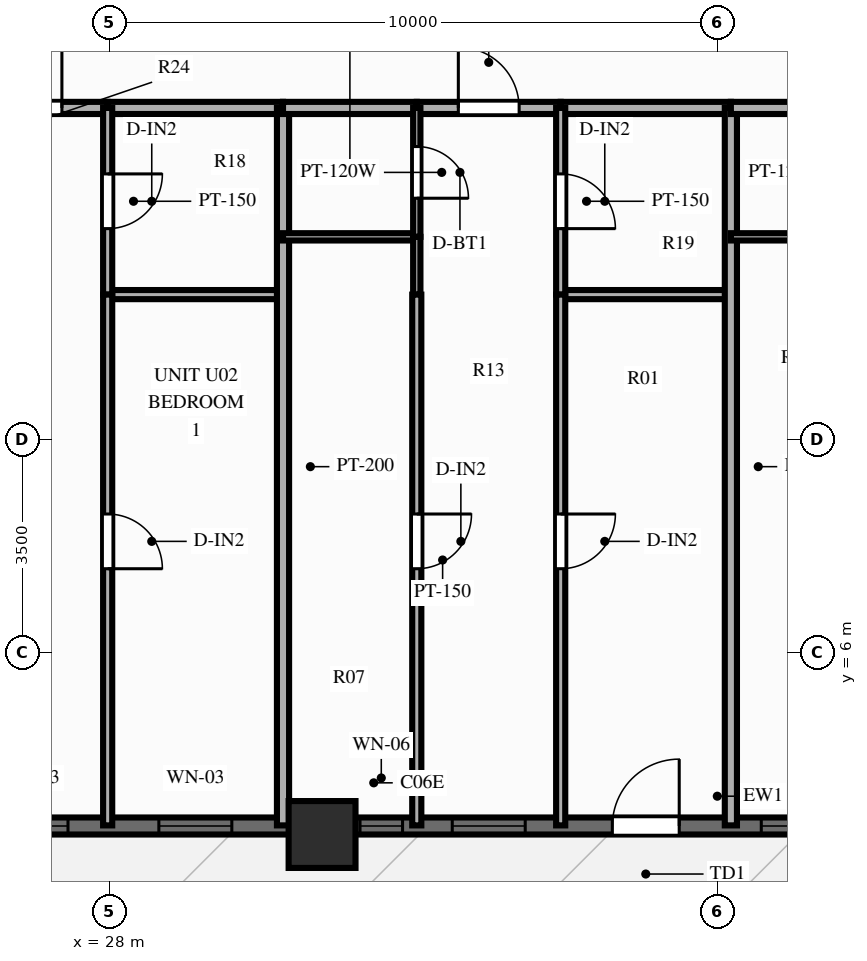
"""IFC4 building model, lengths in metres.
Left out: names, types, materials, properties, quantities, classifications, styles, units other than length and angle.
Written with IfcOpenShell. Run it as: python <this file> out.ifc"""

import sys

from ifc_helpers import new_model, si_unit, direction, frame, frame_2d, origin, origin_2d, place, context, subcontext, project, spatial, rectangle, extrude, source, transform, mapped, element, fill, save


model = new_model("IFC4")
c1 = context("Model", 3, precision=1e-05, world=origin(), true_north=direction((0.0, 1.0)))
c2 = subcontext(c1, "Body", "Model", "MODEL_VIEW")
j1 = project(units=[si_unit("LENGTHUNIT", "METRE"), si_unit("PLANEANGLEUNIT", "RADIAN")], contexts=[c1])
p1 = place(None, origin())
s1 = spatial("IfcSite", under=j1, at=p1, CompositionType="ELEMENT")
p2 = place(p1, origin())
s2 = spatial("IfcBuilding", under=s1, at=p2, CompositionType="ELEMENT")
p3 = place(p2, frame((0.0, 0.0, 25.4)))
s3 = spatial("IfcBuildingStorey", under=s2, at=p3, CompositionType="ELEMENT", Elevation=25.4)
m1 = source(origin(), c2, "Body", "SweptSolid", [
    extrude(rectangle(XDim=1.1, YDim=1.1, at=origin_2d()), origin(), (0.0, 0.0, 1.0), 3.0),
])
p4 = place(p3, frame((31.5, 3.0, 0.0), z_axis=(0.0, 0.0, 1.0), x_axis=(1.0, 0.0, 0.0)))
e1 = element("IfcColumn", 1, at=p4, inside=s3, PredefinedType="COLUMN", context=c2, shape_type="MappedRepresentation", body=[
    mapped(m1, transform((0.0, 0.0, 0.0), scale=1.0)),
])
p5 = place(p3, frame((15.5, 3.14, 0.0), z_axis=(0.0, 0.0, 1.0), x_axis=(1.0, 0.0, 0.0)))
e2 = element("IfcWall", 2, at=p5, inside=s3, PredefinedType="SOLIDWALL", context=c2, shape_type="SweptSolid", body=[
    extrude(rectangle(XDim=45.0, YDim=0.28, at=frame_2d((22.5, 0.0))), origin(), (0.0, 0.0, 1.0), 2.28),
])
p6 = place(p5, frame((0.785, 0.0, 0.25)))
e3 = element("IfcOpeningElement", 3, at=p6, cuts=e2, PredefinedType="OPENING", context=c2, shape_type="SweptSolid", body=[
    extrude(rectangle(XDim=1.2, YDim=1.5, at=frame_2d((0.6, 0.75))), frame((0.0, 0.152, 0.0), z_axis=(0.0, -1.0, 0.0), x_axis=(1.0, 0.0, 0.0)), (0.0, 0.0, 1.0), 0.304),
])
p7 = place(p5, frame((3.033, 0.0, 0.25)))
e4 = element("IfcOpeningElement", 4, at=p7, cuts=e2, PredefinedType="OPENING", context=c2, shape_type="SweptSolid", body=[
    extrude(rectangle(XDim=1.2, YDim=1.5, at=frame_2d((0.6, 0.75))), frame((0.0, 0.152, 0.0), z_axis=(0.0, -1.0, 0.0), x_axis=(1.0, 0.0, 0.0)), (0.0, 0.0, 1.0), 0.304),
])
p8 = place(p5, frame((5.727, 0.0, 0.25)))
e5 = element("IfcOpeningElement", 5, at=p8, cuts=e2, PredefinedType="OPENING", context=c2, shape_type="SweptSolid", body=[
    extrude(rectangle(XDim=1.2, YDim=1.5, at=frame_2d((0.6, 0.75))), frame((0.0, 0.152, 0.0), z_axis=(0.0, -1.0, 0.0), x_axis=(1.0, 0.0, 0.0)), (0.0, 0.0, 1.0), 0.304),
])
p9 = place(p5, frame((8.269, 0.0, 0.25)))
e6 = element("IfcOpeningElement", 6, at=p9, cuts=e2, PredefinedType="OPENING", context=c2, shape_type="SweptSolid", body=[
    extrude(rectangle(XDim=1.2, YDim=1.5, at=frame_2d((0.6, 0.75))), frame((0.0, 0.152, 0.0), z_axis=(0.0, -1.0, 0.0), x_axis=(1.0, 0.0, 0.0)), (0.0, 0.0, 1.0), 0.304),
])
p10 = place(p5, frame((10.621, 0.0, 0.25)))
e7 = element("IfcOpeningElement", 7, at=p10, cuts=e2, PredefinedType="OPENING", context=c2, shape_type="SweptSolid", body=[
    extrude(rectangle(XDim=1.2, YDim=1.5, at=frame_2d((0.6, 0.75))), frame((0.0, 0.152, 0.0), z_axis=(0.0, -1.0, 0.0), x_axis=(1.0, 0.0, 0.0)), (0.0, 0.0, 1.0), 0.304),
])
p11 = place(p5, frame((13.316, 0.0, 0.25)))
e8 = element("IfcOpeningElement", 8, at=p11, cuts=e2, PredefinedType="OPENING", context=c2, shape_type="SweptSolid", body=[
    extrude(rectangle(XDim=1.2, YDim=1.5, at=frame_2d((0.6, 0.75))), frame((0.0, 0.152, 0.0), z_axis=(0.0, -1.0, 0.0), x_axis=(1.0, 0.0, 0.0)), (0.0, 0.0, 1.0), 0.304),
])
p12 = place(p5, frame((16.624, 0.0, 0.25)))
e9 = element("IfcOpeningElement", 9, at=p12, cuts=e2, PredefinedType="OPENING", context=c2, shape_type="SweptSolid", body=[
    extrude(rectangle(XDim=0.7, YDim=1.5, at=frame_2d((0.35, 0.75))), frame((0.0, 0.152, 0.0), z_axis=(0.0, -1.0, 0.0), x_axis=(1.0, 0.0, 0.0)), (0.0, 0.0, 1.0), 0.304),
])
p13 = place(p5, frame((18.141, 0.0, 0.25)))
e10 = element("IfcOpeningElement", 10, at=p13, cuts=e2, PredefinedType="OPENING", context=c2, shape_type="SweptSolid", body=[
    extrude(rectangle(XDim=1.2, YDim=1.5, at=frame_2d((0.6, 0.75))), frame((0.0, 0.152, 0.0), z_axis=(0.0, -1.0, 0.0), x_axis=(1.0, 0.0, 0.0)), (0.0, 0.0, 1.0), 0.304),
])
p14 = place(p5, frame((21.874, 0.0, 0.0), z_axis=(0.0, 0.0, 1.0), x_axis=(-1.0, 0.0, 0.0)))
e11 = element("IfcOpeningElement", 11, at=p14, cuts=e2, PredefinedType="OPENING", context=c2, shape_type="SweptSolid", body=[
    extrude(rectangle(XDim=1.1, YDim=2.15, at=frame_2d((0.55, 1.075))), frame((0.0, 0.152, 0.0), z_axis=(0.0, -1.0, 0.0), x_axis=(1.0, 0.0, 0.0)), (0.0, 0.0, 1.0), 0.304),
])
p15 = place(p5, frame((23.223, 0.0, 0.25)))
e12 = element("IfcOpeningElement", 12, at=p15, cuts=e2, PredefinedType="OPENING", context=c2, shape_type="SweptSolid", body=[
    extrude(rectangle(XDim=1.2, YDim=1.5, at=frame_2d((0.6, 0.75))), frame((0.0, 0.152, 0.0), z_axis=(0.0, -1.0, 0.0), x_axis=(1.0, 0.0, 0.0)), (0.0, 0.0, 1.0), 0.304),
])
p16 = place(p5, frame((25.507, 0.0, 0.25)))
e13 = element("IfcOpeningElement", 13, at=p16, cuts=e2, PredefinedType="OPENING", context=c2, shape_type="SweptSolid", body=[
    extrude(rectangle(XDim=1.2, YDim=1.5, at=frame_2d((0.6, 0.75))), frame((0.0, 0.152, 0.0), z_axis=(0.0, -1.0, 0.0), x_axis=(1.0, 0.0, 0.0)), (0.0, 0.0, 1.0), 0.304),
])
p17 = place(p5, frame((27.6, 0.0, 0.25)))
e14 = element("IfcOpeningElement", 14, at=p17, cuts=e2, PredefinedType="OPENING", context=c2, shape_type="SweptSolid", body=[
    extrude(rectangle(XDim=0.7, YDim=1.5, at=frame_2d((0.35, 0.75))), frame((0.0, 0.152, 0.0), z_axis=(0.0, -1.0, 0.0), x_axis=(1.0, 0.0, 0.0)), (0.0, 0.0, 1.0), 0.304),
])
p18 = place(p5, frame((30.589, 0.0, 0.25)))
e15 = element("IfcOpeningElement", 15, at=p18, cuts=e2, PredefinedType="OPENING", context=c2, shape_type="SweptSolid", body=[
    extrude(rectangle(XDim=1.2, YDim=1.5, at=frame_2d((0.6, 0.75))), frame((0.0, 0.152, 0.0), z_axis=(0.0, -1.0, 0.0), x_axis=(1.0, 0.0, 0.0)), (0.0, 0.0, 1.0), 0.304),
])
p19 = place(p5, frame((32.872, 0.0, 0.25)))
e16 = element("IfcOpeningElement", 16, at=p19, cuts=e2, PredefinedType="OPENING", context=c2, shape_type="SweptSolid", body=[
    extrude(rectangle(XDim=1.2, YDim=1.5, at=frame_2d((0.6, 0.75))), frame((0.0, 0.152, 0.0), z_axis=(0.0, -1.0, 0.0), x_axis=(1.0, 0.0, 0.0)), (0.0, 0.0, 1.0), 0.304),
])
p20 = place(p5, frame((35.455, 0.0, 0.25)))
e17 = element("IfcOpeningElement", 17, at=p20, cuts=e2, PredefinedType="OPENING", context=c2, shape_type="SweptSolid", body=[
    extrude(rectangle(XDim=1.2, YDim=1.5, at=frame_2d((0.6, 0.75))), frame((0.0, 0.152, 0.0), z_axis=(0.0, -1.0, 0.0), x_axis=(1.0, 0.0, 0.0)), (0.0, 0.0, 1.0), 0.304),
])
p21 = place(p5, frame((37.954, 0.0, 0.25)))
e18 = element("IfcOpeningElement", 18, at=p21, cuts=e2, PredefinedType="OPENING", context=c2, shape_type="SweptSolid", body=[
    extrude(rectangle(XDim=1.2, YDim=1.5, at=frame_2d((0.6, 0.75))), frame((0.0, 0.152, 0.0), z_axis=(0.0, -1.0, 0.0), x_axis=(1.0, 0.0, 0.0)), (0.0, 0.0, 1.0), 0.304),
])
p22 = place(p5, frame((40.238, 0.0, 0.25)))
e19 = element("IfcOpeningElement", 19, at=p22, cuts=e2, PredefinedType="OPENING", context=c2, shape_type="SweptSolid", body=[
    extrude(rectangle(XDim=1.2, YDim=1.5, at=frame_2d((0.6, 0.75))), frame((0.0, 0.152, 0.0), z_axis=(0.0, -1.0, 0.0), x_axis=(1.0, 0.0, 0.0)), (0.0, 0.0, 1.0), 0.304),
])
p23 = place(p5, frame((42.716, 0.0, 0.25)))
e20 = element("IfcOpeningElement", 20, at=p23, cuts=e2, PredefinedType="OPENING", context=c2, shape_type="SweptSolid", body=[
    extrude(rectangle(XDim=1.2, YDim=1.5, at=frame_2d((0.6, 0.75))), frame((0.0, 0.152, 0.0), z_axis=(0.0, -1.0, 0.0), x_axis=(1.0, 0.0, 0.0)), (0.0, 0.0, 1.0), 0.304),
])
p24 = place(p3, frame((25.469, 14.95, 0.0), z_axis=(0.0, 0.0, 1.0), x_axis=(1.0, 0.0, 0.0)))
e21 = element("IfcWall", 21, at=p24, inside=s3, PredefinedType="PARTITIONING", context=c2, shape_type="SweptSolid", body=[
    extrude(rectangle(XDim=2.505, YDim=0.2, at=frame_2d((1.252, 0.0))), origin(), (0.0, 0.0, 1.0), 2.79),
])
p25 = place(p24, frame((0.752, 0.0, 0.0)))
e22 = element("IfcOpeningElement", 22, at=p25, cuts=e21, PredefinedType="OPENING", context=c2, shape_type="SweptSolid", body=[
    extrude(rectangle(XDim=1.0, YDim=2.15, at=frame_2d((0.5, 1.075))), frame((0.0, 0.112, 0.0), z_axis=(0.0, -1.0, 0.0), x_axis=(1.0, 0.0, 0.0)), (0.0, 0.0, 1.0), 0.224),
])
p26 = place(p3, frame((27.974, 14.95, 0.0), z_axis=(0.0, 0.0, 1.0), x_axis=(1.0, 0.0, 0.0)))
e23 = element("IfcWall", 23, at=p26, inside=s3, PredefinedType="PARTITIONING", context=c2, shape_type="SweptSolid", body=[
    extrude(rectangle(XDim=2.884, YDim=0.2, at=frame_2d((1.442, 0.0))), origin(), (0.0, 0.0, 1.0), 2.79),
])
p27 = place(p3, frame((27.974, 11.88, 0.0), z_axis=(0.0, 0.0, 1.0), x_axis=(1.0, 0.0, 0.0)))
e24 = element("IfcWall", 24, at=p27, inside=s3, PredefinedType="PARTITIONING", context=c2, shape_type="SweptSolid", body=[
    extrude(rectangle(XDim=2.884, YDim=0.15, at=frame_2d((1.442, 0.0))), origin(), (0.0, 0.0, 1.0), 2.79),
])
p28 = place(p3, frame((27.974, 14.95, 0.0), z_axis=(0.0, 0.0, 1.0), x_axis=(0.0, -1.0, 0.0)))
e25 = element("IfcWall", 25, at=p28, inside=s3, PredefinedType="PARTITIONING", context=c2, shape_type="SweptSolid", body=[
    extrude(rectangle(XDim=3.07, YDim=0.15, at=frame_2d((1.535, 0.0))), origin(), (0.0, 0.0, 1.0), 2.79),
])
p29 = place(p28, frame((1.085, 0.0, 0.0)))
e26 = element("IfcOpeningElement", 26, at=p29, cuts=e25, PredefinedType="OPENING", context=c2, shape_type="SweptSolid", body=[
    extrude(rectangle(XDim=0.9, YDim=2.1, at=frame_2d((0.45, 1.05))), frame((0.0, 0.087, 0.0), z_axis=(0.0, -1.0, 0.0), x_axis=(1.0, 0.0, 0.0)), (0.0, 0.0, 1.0), 0.174),
])
p30 = place(p3, frame((27.974, 11.88, 0.0), z_axis=(0.0, 0.0, 1.0), x_axis=(0.0, -1.0, 0.0)))
e27 = element("IfcWall", 27, at=p30, inside=s3, PredefinedType="PARTITIONING", context=c2, shape_type="SweptSolid", body=[
    extrude(rectangle(XDim=8.73, YDim=0.15, at=frame_2d((4.365, 0.0))), origin(), (0.0, 0.0, 1.0), 2.79),
])
p31 = place(p30, frame((3.609, 0.0, 0.0)))
e28 = element("IfcOpeningElement", 28, at=p31, cuts=e27, PredefinedType="OPENING", context=c2, shape_type="SweptSolid", body=[
    extrude(rectangle(XDim=0.9, YDim=2.1, at=frame_2d((0.45, 1.05))), frame((0.0, 0.087, 0.0), z_axis=(0.0, -1.0, 0.0), x_axis=(1.0, 0.0, 0.0)), (0.0, 0.0, 1.0), 0.174),
])
p32 = place(p3, frame((30.858, 14.95, 0.0), z_axis=(0.0, 0.0, 1.0), x_axis=(0.0, -1.0, 0.0)))
e29 = element("IfcWall", 29, at=p32, inside=s3, PredefinedType="PARTITIONING", context=c2, shape_type="SweptSolid", body=[
    extrude(rectangle(XDim=11.8, YDim=0.2, at=frame_2d((5.9, 0.0))), origin(), (0.0, 0.0, 1.0), 2.24),
])
p33 = place(p3, frame((30.858, 14.95, 0.0), z_axis=(0.0, 0.0, 1.0), x_axis=(1.0, 0.0, 0.0)))
e30 = element("IfcWall", 30, at=p33, inside=s3, PredefinedType="PARTITIONING", context=c2, shape_type="SweptSolid", body=[
    extrude(rectangle(XDim=2.2, YDim=0.2, at=frame_2d((1.1, 0.0))), origin(), (0.0, 0.0, 1.0), 2.79),
])
p34 = place(p3, frame((33.058, 14.95, 0.0), z_axis=(0.0, 0.0, 1.0), x_axis=(1.0, 0.0, 0.0)))
e31 = element("IfcWall", 31, at=p34, inside=s3, PredefinedType="PARTITIONING", context=c2, shape_type="SweptSolid", body=[
    extrude(rectangle(XDim=2.367, YDim=0.2, at=frame_2d((1.183, 0.0))), origin(), (0.0, 0.0, 1.0), 2.79),
])
p35 = place(p34, frame((0.683, 0.0, 0.0)))
e32 = element("IfcOpeningElement", 32, at=p35, cuts=e31, PredefinedType="OPENING", context=c2, shape_type="SweptSolid", body=[
    extrude(rectangle(XDim=1.0, YDim=2.15, at=frame_2d((0.5, 1.075))), frame((0.0, 0.112, 0.0), z_axis=(0.0, -1.0, 0.0), x_axis=(1.0, 0.0, 0.0)), (0.0, 0.0, 1.0), 0.224),
])
p36 = place(p3, frame((35.424, 14.95, 0.0), z_axis=(0.0, 0.0, 1.0), x_axis=(1.0, 0.0, 0.0)))
e33 = element("IfcWall", 33, at=p36, inside=s3, PredefinedType="PARTITIONING", context=c2, shape_type="SweptSolid", body=[
    extrude(rectangle(XDim=2.799, YDim=0.2, at=frame_2d((1.399, 0.0))), origin(), (0.0, 0.0, 1.0), 2.79),
])
p37 = place(p3, frame((30.858, 12.83, 0.0), z_axis=(0.0, 0.0, 1.0), x_axis=(1.0, 0.0, 0.0)))
e34 = element("IfcWall", 34, at=p37, inside=s3, PredefinedType="PARTITIONING", context=c2, shape_type="SweptSolid", body=[
    extrude(rectangle(XDim=2.2, YDim=0.12, at=frame_2d((1.1, 0.0))), origin(), (0.0, 0.0, 1.0), 2.79),
])
p38 = place(p3, frame((35.424, 11.88, 0.0), z_axis=(0.0, 0.0, 1.0), x_axis=(1.0, 0.0, 0.0)))
e35 = element("IfcWall", 35, at=p38, inside=s3, PredefinedType="PARTITIONING", context=c2, shape_type="SweptSolid", body=[
    extrude(rectangle(XDim=2.799, YDim=0.15, at=frame_2d((1.399, 0.0))), origin(), (0.0, 0.0, 1.0), 2.79),
])
p39 = place(p3, frame((33.058, 14.95, 0.0), z_axis=(0.0, 0.0, 1.0), x_axis=(0.0, -1.0, 0.0)))
e36 = element("IfcWall", 36, at=p39, inside=s3, PredefinedType="PARTITIONING", context=c2, shape_type="SweptSolid", body=[
    extrude(rectangle(XDim=2.12, YDim=0.12, at=frame_2d((1.06, 0.0))), origin(), (0.0, 0.0, 1.0), 2.79),
])
p40 = place(p39, frame((0.635, 0.0, 0.0)))
e37 = element("IfcOpeningElement", 37, at=p40, cuts=e36, PredefinedType="OPENING", context=c2, shape_type="SweptSolid", body=[
    extrude(rectangle(XDim=0.85, YDim=2.05, at=frame_2d((0.425, 1.025))), frame((0.0, 0.072, 0.0), z_axis=(0.0, -1.0, 0.0), x_axis=(1.0, 0.0, 0.0)), (0.0, 0.0, 1.0), 0.144),
])
p41 = place(p3, frame((33.058, 12.83, 0.0), z_axis=(0.0, 0.0, 1.0), x_axis=(0.0, -1.0, 0.0)))
e38 = element("IfcWall", 38, at=p41, inside=s3, PredefinedType="PARTITIONING", context=c2, shape_type="SweptSolid", body=[
    extrude(rectangle(XDim=0.95, YDim=0.12, at=frame_2d((0.475, 0.0))), origin(), (0.0, 0.0, 1.0), 2.79),
])
p42 = place(p3, frame((33.058, 11.88, 0.0), z_axis=(0.0, 0.0, 1.0), x_axis=(0.0, -1.0, 0.0)))
e39 = element("IfcWall", 39, at=p42, inside=s3, PredefinedType="PARTITIONING", context=c2, shape_type="SweptSolid", body=[
    extrude(rectangle(XDim=8.73, YDim=0.15, at=frame_2d((4.365, 0.0))), origin(), (0.0, 0.0, 1.0), 2.79),
])
p43 = place(p42, frame((3.609, 0.0, 0.0)))
e40 = element("IfcOpeningElement", 40, at=p43, cuts=e39, PredefinedType="OPENING", context=c2, shape_type="SweptSolid", body=[
    extrude(rectangle(XDim=0.9, YDim=2.1, at=frame_2d((0.45, 1.05))), frame((0.0, 0.087, 0.0), z_axis=(0.0, -1.0, 0.0), x_axis=(1.0, 0.0, 0.0)), (0.0, 0.0, 1.0), 0.174),
])
p44 = place(p3, frame((35.424, 14.95, 0.0), z_axis=(0.0, 0.0, 1.0), x_axis=(0.0, -1.0, 0.0)))
e41 = element("IfcWall", 41, at=p44, inside=s3, PredefinedType="PARTITIONING", context=c2, shape_type="SweptSolid", body=[
    extrude(rectangle(XDim=3.07, YDim=0.15, at=frame_2d((1.535, 0.0))), origin(), (0.0, 0.0, 1.0), 2.79),
])
p45 = place(p44, frame((1.085, 0.0, 0.0)))
e42 = element("IfcOpeningElement", 42, at=p45, cuts=e41, PredefinedType="OPENING", context=c2, shape_type="SweptSolid", body=[
    extrude(rectangle(XDim=0.9, YDim=2.1, at=frame_2d((0.45, 1.05))), frame((0.0, 0.087, 0.0), z_axis=(0.0, -1.0, 0.0), x_axis=(1.0, 0.0, 0.0)), (0.0, 0.0, 1.0), 0.174),
])
p46 = place(p3, frame((35.424, 11.88, 0.0), z_axis=(0.0, 0.0, 1.0), x_axis=(0.0, -1.0, 0.0)))
e43 = element("IfcWall", 43, at=p46, inside=s3, PredefinedType="PARTITIONING", context=c2, shape_type="SweptSolid", body=[
    extrude(rectangle(XDim=8.73, YDim=0.15, at=frame_2d((4.365, 0.0))), origin(), (0.0, 0.0, 1.0), 2.79),
])
p47 = place(p46, frame((3.609, 0.0, 0.0)))
e44 = element("IfcOpeningElement", 44, at=p47, cuts=e43, PredefinedType="OPENING", context=c2, shape_type="SweptSolid", body=[
    extrude(rectangle(XDim=0.9, YDim=2.1, at=frame_2d((0.45, 1.05))), frame((0.0, 0.087, 0.0), z_axis=(0.0, -1.0, 0.0), x_axis=(1.0, 0.0, 0.0)), (0.0, 0.0, 1.0), 0.174),
])
p48 = place(p3, frame((38.223, 14.95, 0.0), z_axis=(0.0, 0.0, 1.0), x_axis=(0.0, -1.0, 0.0)))
e45 = element("IfcWall", 45, at=p48, inside=s3, PredefinedType="PARTITIONING", context=c2, shape_type="SweptSolid", body=[
    extrude(rectangle(XDim=11.8, YDim=0.2, at=frame_2d((5.9, 0.0))), origin(), (0.0, 0.0, 1.0), 2.79),
])
p49 = place(p3, frame((38.223, 14.95, 0.0), z_axis=(0.0, 0.0, 1.0), x_axis=(1.0, 0.0, 0.0)))
e46 = element("IfcWall", 46, at=p49, inside=s3, PredefinedType="PARTITIONING", context=c2, shape_type="SweptSolid", body=[
    extrude(rectangle(XDim=2.2, YDim=0.2, at=frame_2d((1.1, 0.0))), origin(), (0.0, 0.0, 1.0), 2.79),
])
p50 = place(p3, frame((38.223, 12.83, 0.0), z_axis=(0.0, 0.0, 1.0), x_axis=(1.0, 0.0, 0.0)))
e47 = element("IfcWall", 47, at=p50, inside=s3, PredefinedType="PARTITIONING", context=c2, shape_type="SweptSolid", body=[
    extrude(rectangle(XDim=2.2, YDim=0.12, at=frame_2d((1.1, 0.0))), origin(), (0.0, 0.0, 1.0), 2.79),
])
m2 = source(origin(), c2, "Body", "SweptSolid", [
    extrude(rectangle(XDim=1.2, YDim=1.5, at=frame_2d((0.6, 0.75))), frame((0.0, 0.03, 0.0), z_axis=(0.0, -1.0, 0.0), x_axis=(1.0, 0.0, 0.0)), (0.0, 0.0, 1.0), 0.06),
])
p51 = place(p10, origin())
e48 = element("IfcWindow", 48, at=p51, inside=s3, PartitioningType="SINGLE_PANEL", PredefinedType="WINDOW", context=c2, shape_type="MappedRepresentation", body=[
    mapped(m2, transform((0.0, 0.0, 0.0), scale=1.0)),
])
fill(e7, e48)
p52 = place(p11, origin())
e49 = element("IfcWindow", 49, at=p52, inside=s3, PartitioningType="SINGLE_PANEL", PredefinedType="WINDOW", context=c2, shape_type="MappedRepresentation", body=[
    mapped(m2, transform((0.0, 0.0, 0.0), scale=1.0)),
])
fill(e8, e49)
m3 = source(origin(), c2, "Body", "SweptSolid", [
    extrude(rectangle(XDim=0.7, YDim=1.5, at=frame_2d((0.35, 0.75))), frame((0.0, 0.03, 0.0), z_axis=(0.0, -1.0, 0.0), x_axis=(1.0, 0.0, 0.0)), (0.0, 0.0, 1.0), 0.06),
])
p53 = place(p12, origin())
e50 = element("IfcWindow", 50, at=p53, inside=s3, PartitioningType="SINGLE_PANEL", PredefinedType="WINDOW", context=c2, shape_type="MappedRepresentation", body=[
    mapped(m3, transform((0.0, 0.0, 0.0), scale=1.0)),
])
fill(e9, e50)
p54 = place(p13, origin())
e51 = element("IfcWindow", 51, at=p54, inside=s3, PartitioningType="SINGLE_PANEL", PredefinedType="WINDOW", context=c2, shape_type="MappedRepresentation", body=[
    mapped(m2, transform((0.0, 0.0, 0.0), scale=1.0)),
])
fill(e10, e51)
m4 = source(origin(), c2, "Body", "SweptSolid", [
    extrude(rectangle(XDim=1.1, YDim=2.15, at=frame_2d((0.55, 1.075))), frame((0.0, 0.025, 0.0), z_axis=(0.0, -1.0, 0.0), x_axis=(1.0, 0.0, 0.0)), (0.0, 0.0, 1.0), 0.05),
])
p55 = place(p14, origin())
e52 = element("IfcDoor", 52, at=p55, inside=s3, OperationType="SINGLE_SWING_LEFT", PredefinedType="DOOR", context=c2, shape_type="MappedRepresentation", body=[
    mapped(m4, transform((0.0, 0.0, 0.0), scale=1.0)),
])
fill(e11, e52)
p56 = place(p15, origin())
e53 = element("IfcWindow", 53, at=p56, inside=s3, PartitioningType="SINGLE_PANEL", PredefinedType="WINDOW", context=c2, shape_type="MappedRepresentation", body=[
    mapped(m2, transform((0.0, 0.0, 0.0), scale=1.0)),
])
fill(e12, e53)
m5 = source(origin(), c2, "Body", "SweptSolid", [
    extrude(rectangle(XDim=1.0, YDim=2.15, at=frame_2d((0.5, 1.075))), frame((0.0, 0.025, 0.0), z_axis=(0.0, -1.0, 0.0), x_axis=(1.0, 0.0, 0.0)), (0.0, 0.0, 1.0), 0.05),
])
p57 = place(p25, origin())
e54 = element("IfcDoor", 54, at=p57, inside=s3, OperationType="SINGLE_SWING_RIGHT", PredefinedType="DOOR", context=c2, shape_type="MappedRepresentation", body=[
    mapped(m5, transform((0.0, 0.0, 0.0), scale=1.0)),
])
fill(e22, e54)
m6 = source(origin(), c2, "Body", "SweptSolid", [
    extrude(rectangle(XDim=0.9, YDim=2.1, at=frame_2d((0.45, 1.05))), frame((0.0, 0.025, 0.0), z_axis=(0.0, -1.0, 0.0), x_axis=(1.0, 0.0, 0.0)), (0.0, 0.0, 1.0), 0.05),
])
p58 = place(p29, origin())
e55 = element("IfcDoor", 55, at=p58, inside=s3, OperationType="SINGLE_SWING_LEFT", PredefinedType="DOOR", context=c2, shape_type="MappedRepresentation", body=[
    mapped(m6, transform((0.0, 0.0, 0.0), scale=1.0)),
])
fill(e26, e55)
p59 = place(p31, origin())
e56 = element("IfcDoor", 56, at=p59, inside=s3, OperationType="SINGLE_SWING_RIGHT", PredefinedType="DOOR", context=c2, shape_type="MappedRepresentation", body=[
    mapped(m6, transform((0.0, 0.0, 0.0), scale=1.0)),
])
fill(e28, e56)
p60 = place(p35, origin())
e57 = element("IfcDoor", 57, at=p60, inside=s3, OperationType="SINGLE_SWING_LEFT", PredefinedType="DOOR", context=c2, shape_type="MappedRepresentation", body=[
    mapped(m5, transform((0.0, 0.0, 0.0), scale=1.0)),
])
fill(e32, e57)
m7 = source(origin(), c2, "Body", "SweptSolid", [
    extrude(rectangle(XDim=0.85, YDim=2.05, at=frame_2d((0.425, 1.025))), frame((0.0, 0.025, 0.0), z_axis=(0.0, -1.0, 0.0), x_axis=(1.0, 0.0, 0.0)), (0.0, 0.0, 1.0), 0.05),
])
p61 = place(p40, origin())
e58 = element("IfcDoor", 58, at=p61, inside=s3, OperationType="SINGLE_SWING_RIGHT", PredefinedType="DOOR", context=c2, shape_type="MappedRepresentation", body=[
    mapped(m7, transform((0.0, 0.0, 0.0), scale=1.0)),
])
fill(e37, e58)
p62 = place(p43, origin())
e59 = element("IfcDoor", 59, at=p62, inside=s3, OperationType="SINGLE_SWING_LEFT", PredefinedType="DOOR", context=c2, shape_type="MappedRepresentation", body=[
    mapped(m6, transform((0.0, 0.0, 0.0), scale=1.0)),
])
fill(e40, e59)
p63 = place(p45, origin())
e60 = element("IfcDoor", 60, at=p63, inside=s3, OperationType="SINGLE_SWING_RIGHT", PredefinedType="DOOR", context=c2, shape_type="MappedRepresentation", body=[
    mapped(m6, transform((0.0, 0.0, 0.0), scale=1.0)),
])
fill(e42, e60)
p64 = place(p47, origin())
e61 = element("IfcDoor", 61, at=p64, inside=s3, OperationType="SINGLE_SWING_LEFT", PredefinedType="DOOR", context=c2, shape_type="MappedRepresentation", body=[
    mapped(m6, transform((0.0, 0.0, 0.0), scale=1.0)),
])
fill(e44, e61)
save(model, sys.argv[1])
